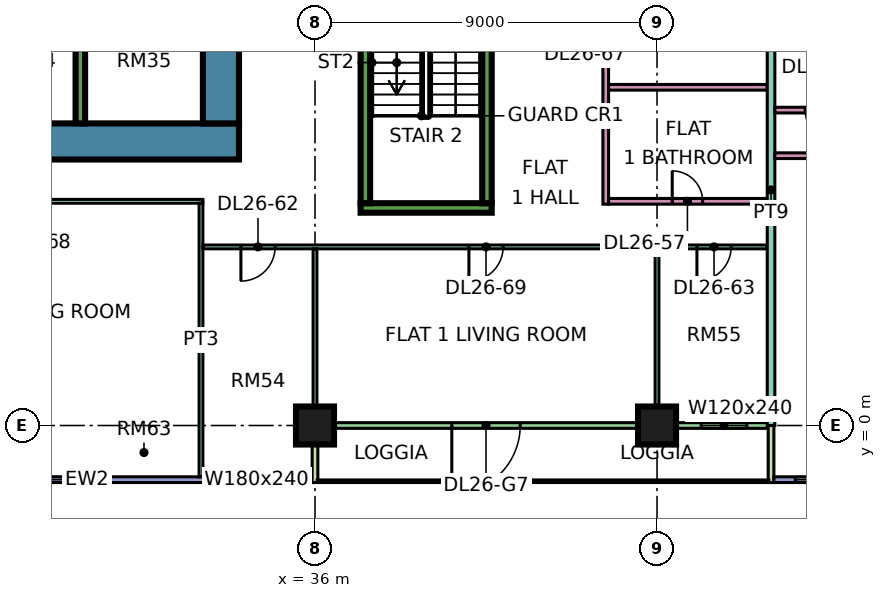
"""IFC4 building model, lengths in metres.
Left out: names, types, materials, properties, quantities, classifications, styles, units other than length and angle.
Written with IfcOpenShell. Run it as: python <this file> out.ifc"""

import sys

from ifc_helpers import new_model, si_unit, direction, frame, frame_2d, origin, origin_2d, place, context, subcontext, project, spatial, rectangle, extrude, element, fill, save


model = new_model("IFC4")
c1 = context("Model", 3, precision=1e-05, world=origin(), true_north=direction((0.0, 1.0)))
c2 = subcontext(c1, "Body", "Model", "MODEL_VIEW")
j1 = project(units=[si_unit("LENGTHUNIT", "METRE"), si_unit("PLANEANGLEUNIT", "RADIAN")], contexts=[c1])
p1 = place(None, origin())
s1 = spatial("IfcSite", under=j1, at=p1, CompositionType="ELEMENT")
p2 = place(p1, origin())
s2 = spatial("IfcBuilding", under=s1, at=p2, CompositionType="ELEMENT")
p3 = place(p2, frame((0.0, 0.0, 114.4)))
s3 = spatial("IfcBuildingStorey", under=s2, at=p3, CompositionType="ELEMENT", Elevation=114.4)
for number, where, z_axis, x_axis in (
    (1, (36.0, 0.0, 0.0), (0.0, 0.0, 1.0), (1.0, 0.0, 0.0)),
    (2, (45.0, 0.0, 0.0), (0.0, 0.0, 1.0), (1.0, 0.0, 0.0)),
):
    element("IfcColumn", number, at=place(p3, frame(where, z_axis=z_axis, x_axis=x_axis)), inside=s3, PredefinedType="COLUMN", context=c2, shape_type="SweptSolid", body=[
        extrude(rectangle(XDim=1.0, YDim=1.0, at=origin_2d()), origin(), (0.0, 0.0, 1.0), 3.75),
    ])
p4 = place(p3, frame((9.0, 7.475, 0.0), z_axis=(0.0, 0.0, 1.0), x_axis=(1.0, 0.0, 0.0)))
e3 = element("IfcWall", 3, at=p4, inside=s3, PredefinedType="SHEAR", context=c2, shape_type="SweptSolid", body=[
    extrude(rectangle(XDim=25.0, YDim=0.95, at=frame_2d((12.5, 0.0))), origin(), (0.0, 0.0, 1.0), 3.75),
])
p5 = place(p3, frame((33.525, 7.95, 0.0), z_axis=(0.0, 0.0, 1.0), x_axis=(0.0, 1.0, 0.0)))
e4 = element("IfcWall", 4, at=p5, inside=s3, PredefinedType="SHEAR", context=c2, shape_type="SweptSolid", body=[
    extrude(rectangle(XDim=11.1, YDim=0.95, at=frame_2d((5.55, 0.0))), origin(), (0.0, 0.0, 1.0), 3.75),
])
p6 = place(p5, frame((5.25, 0.0, 0.0)))
e5 = element("IfcOpeningElement", 5, at=p6, cuts=e4, PredefinedType="OPENING", context=c2, shape_type="SweptSolid", body=[
    extrude(rectangle(XDim=1.8, YDim=2.4, at=frame_2d((0.9, 1.2))), frame((0.0, 0.485, 0.0), z_axis=(0.0, -1.0, 0.0), x_axis=(1.0, 0.0, 0.0)), (0.0, 0.0, 1.0), 0.97),
])
p7 = place(p3, frame((29.825, 7.95, 0.0), z_axis=(0.0, 0.0, 1.0), x_axis=(0.0, 1.0, 0.0)))
e6 = element("IfcWall", 6, at=p7, inside=s3, PredefinedType="SHEAR", context=c2, shape_type="SweptSolid", body=[
    extrude(rectangle(XDim=3.25, YDim=0.25, at=frame_2d((1.625, 0.0))), origin(), (0.0, 0.0, 1.0), 3.75),
])
p8 = place(p3, frame((37.2, 5.725, 0.0), z_axis=(0.0, 0.0, 1.0), x_axis=(1.0, 0.0, 0.0)))
e7 = element("IfcWall", 7, at=p8, inside=s3, PredefinedType="SHEAR", context=c2, shape_type="SweptSolid", body=[
    extrude(rectangle(XDim=3.45, YDim=0.25, at=frame_2d((1.725, 0.0))), origin(), (0.0, 0.0, 1.0), 3.75),
])
for number, where, z_axis, x_axis in (
    (8, (37.325, 5.85, 0.0), (0.0, 0.0, 1.0), (0.0, 1.0, 0.0)),
    (9, (40.525, 5.85, 0.0), (0.0, 0.0, 1.0), (0.0, 1.0, 0.0)),
):
    element("IfcWall", number, at=place(p3, frame(where, z_axis=z_axis, x_axis=x_axis)), inside=s3, PredefinedType="SHEAR", context=c2, shape_type="SweptSolid", body=[
        extrude(rectangle(XDim=6.5, YDim=0.25, at=frame_2d((3.25, 0.0))), origin(), (0.0, 0.0, 1.0), 3.75),
    ])
p9 = place(p3, frame((24.075, -1.425, 0.0), z_axis=(0.0, 0.0, 1.0), x_axis=(1.0, 0.0, 0.0)))
e10 = element("IfcWall", 10, at=p9, inside=s3, PredefinedType="SOLIDWALL", context=c2, shape_type="SweptSolid", body=[
    extrude(rectangle(XDim=11.85, YDim=0.15, at=frame_2d((5.925, 0.0))), origin(), (0.0, 0.0, 1.0), 3.35),
])
p10 = place(p9, frame((2.962, 0.0, 0.45)))
e11 = element("IfcOpeningElement", 11, at=p10, cuts=e10, PredefinedType="OPENING", context=c2, shape_type="SweptSolid", body=[
    extrude(rectangle(XDim=3.0, YDim=2.4, at=frame_2d((1.5, 1.2))), frame((0.0, 0.085, 0.0), z_axis=(0.0, -1.0, 0.0), x_axis=(1.0, 0.0, 0.0)), (0.0, 0.0, 1.0), 0.17),
])
p11 = place(p9, frame((9.488, 0.0, 0.45)))
e12 = element("IfcOpeningElement", 12, at=p11, cuts=e10, PredefinedType="OPENING", context=c2, shape_type="SweptSolid", body=[
    extrude(rectangle(XDim=1.8, YDim=2.4, at=frame_2d((0.9, 1.2))), frame((0.0, 0.085, 0.0), z_axis=(0.0, -1.0, 0.0), x_axis=(1.0, 0.0, 0.0)), (0.0, 0.0, 1.0), 0.17),
])
p12 = place(p3, frame((36.075, 0.0, 0.0), z_axis=(0.0, 0.0, 1.0), x_axis=(1.0, 0.0, 0.0)))
e13 = element("IfcWall", 13, at=p12, inside=s3, PredefinedType="SOLIDWALL", context=c2, shape_type="SweptSolid", body=[
    extrude(rectangle(XDim=11.85, YDim=0.15, at=frame_2d((5.925, 0.0))), origin(), (0.0, 0.0, 1.0), 3.35),
])
p13 = place(p12, frame((3.525, 0.0, 0.0)))
e14 = element("IfcOpeningElement", 14, at=p13, cuts=e13, PredefinedType="OPENING", context=c2, shape_type="SweptSolid", body=[
    extrude(rectangle(XDim=1.8, YDim=2.4, at=frame_2d((0.9, 1.2))), frame((0.0, 0.085, 0.0), z_axis=(0.0, -1.0, 0.0), x_axis=(1.0, 0.0, 0.0)), (0.0, 0.0, 1.0), 0.17),
])
p14 = place(p12, frame((10.087, 0.0, 0.45)))
e15 = element("IfcOpeningElement", 15, at=p14, cuts=e13, PredefinedType="OPENING", context=c2, shape_type="SweptSolid", body=[
    extrude(rectangle(XDim=1.2, YDim=2.4, at=frame_2d((0.6, 1.2))), frame((0.0, 0.085, 0.0), z_axis=(0.0, -1.0, 0.0), x_axis=(1.0, 0.0, 0.0)), (0.0, 0.0, 1.0), 0.17),
])
for number, where, z_axis, x_axis in (
    (16, (36.0, -1.5, 0.0), (0.0, 0.0, 1.0), (0.0, 1.0, 0.0)),
    (17, (48.0, -1.5, 0.0), (0.0, 0.0, 1.0), (0.0, 1.0, 0.0)),
):
    element("IfcWall", number, at=place(p3, frame(where, z_axis=z_axis, x_axis=x_axis)), inside=s3, PredefinedType="SOLIDWALL", context=c2, shape_type="SweptSolid", body=[
        extrude(rectangle(XDim=1.5, YDim=0.15, at=frame_2d((0.75, 0.0))), origin(), (0.0, 0.0, 1.0), 3.35),
    ])
p15 = place(p3, frame((48.075, -1.425, 0.0), z_axis=(0.0, 0.0, 1.0), x_axis=(1.0, 0.0, 0.0)))
e18 = element("IfcWall", 18, at=p15, inside=s3, PredefinedType="SOLIDWALL", context=c2, shape_type="SweptSolid", body=[
    extrude(rectangle(XDim=11.85, YDim=0.15, at=frame_2d((5.925, 0.0))), origin(), (0.0, 0.0, 1.0), 3.35),
])
p16 = place(p15, frame((0.562, 0.0, 0.45)))
e19 = element("IfcOpeningElement", 19, at=p16, cuts=e18, PredefinedType="OPENING", context=c2, shape_type="SweptSolid", body=[
    extrude(rectangle(XDim=1.8, YDim=2.4, at=frame_2d((0.9, 1.2))), frame((0.0, 0.085, 0.0), z_axis=(0.0, -1.0, 0.0), x_axis=(1.0, 0.0, 0.0)), (0.0, 0.0, 1.0), 0.17),
])
p17 = place(p15, frame((3.525, 0.0, 0.45)))
e20 = element("IfcOpeningElement", 20, at=p17, cuts=e18, PredefinedType="OPENING", context=c2, shape_type="SweptSolid", body=[
    extrude(rectangle(XDim=1.8, YDim=2.4, at=frame_2d((0.9, 1.2))), frame((0.0, 0.085, 0.0), z_axis=(0.0, -1.0, 0.0), x_axis=(1.0, 0.0, 0.0)), (0.0, 0.0, 1.0), 0.17),
])
p18 = place(p15, frame((7.387, 0.0, 0.45)))
e21 = element("IfcOpeningElement", 21, at=p18, cuts=e18, PredefinedType="OPENING", context=c2, shape_type="SweptSolid", body=[
    extrude(rectangle(XDim=3.0, YDim=2.4, at=frame_2d((1.5, 1.2))), frame((0.0, 0.085, 0.0), z_axis=(0.0, -1.0, 0.0), x_axis=(1.0, 0.0, 0.0)), (0.0, 0.0, 1.0), 0.17),
])
p19 = place(p3, frame((11.95, 5.9, 0.0), z_axis=(0.0, 0.0, 1.0), x_axis=(1.0, 0.0, 0.0)))
e22 = element("IfcWall", 22, at=p19, inside=s3, PredefinedType="PARTITIONING", context=c2, shape_type="SweptSolid", body=[
    extrude(rectangle(XDim=21.1, YDim=0.1, at=frame_2d((10.55, 0.0))), origin(), (0.0, 0.0, 1.0), 3.35),
])
p20 = place(p19, frame((1.1, 0.0, 0.0)))
e23 = element("IfcOpeningElement", 23, at=p20, cuts=e22, PredefinedType="OPENING", context=c2, shape_type="SweptSolid", body=[
    extrude(rectangle(XDim=0.9, YDim=2.1, at=frame_2d((0.45, 1.05))), frame((0.0, 0.06, 0.0), z_axis=(0.0, -1.0, 0.0), x_axis=(1.0, 0.0, 0.0)), (0.0, 0.0, 1.0), 0.12),
])
p21 = place(p19, frame((4.1, 0.0, 0.0)))
e24 = element("IfcOpeningElement", 24, at=p21, cuts=e22, PredefinedType="OPENING", context=c2, shape_type="SweptSolid", body=[
    extrude(rectangle(XDim=0.9, YDim=2.1, at=frame_2d((0.45, 1.05))), frame((0.0, 0.06, 0.0), z_axis=(0.0, -1.0, 0.0), x_axis=(1.0, 0.0, 0.0)), (0.0, 0.0, 1.0), 0.12),
])
p22 = place(p19, frame((7.1, 0.0, 0.0)))
e25 = element("IfcOpeningElement", 25, at=p22, cuts=e22, PredefinedType="OPENING", context=c2, shape_type="SweptSolid", body=[
    extrude(rectangle(XDim=0.9, YDim=2.1, at=frame_2d((0.45, 1.05))), frame((0.0, 0.06, 0.0), z_axis=(0.0, -1.0, 0.0), x_axis=(1.0, 0.0, 0.0)), (0.0, 0.0, 1.0), 0.12),
])
p23 = place(p19, frame((10.1, 0.0, 0.0)))
e26 = element("IfcOpeningElement", 26, at=p23, cuts=e22, PredefinedType="OPENING", context=c2, shape_type="SweptSolid", body=[
    extrude(rectangle(XDim=0.9, YDim=2.1, at=frame_2d((0.45, 1.05))), frame((0.0, 0.06, 0.0), z_axis=(0.0, -1.0, 0.0), x_axis=(1.0, 0.0, 0.0)), (0.0, 0.0, 1.0), 0.12),
])
p24 = place(p19, frame((16.1, 0.0, 0.0)))
e27 = element("IfcOpeningElement", 27, at=p24, cuts=e22, PredefinedType="OPENING", context=c2, shape_type="SweptSolid", body=[
    extrude(rectangle(XDim=0.9, YDim=2.1, at=frame_2d((0.45, 1.05))), frame((0.0, 0.06, 0.0), z_axis=(0.0, -1.0, 0.0), x_axis=(1.0, 0.0, 0.0)), (0.0, 0.0, 1.0), 0.12),
])
p25 = place(p3, frame((33.0, -1.35, 0.0), z_axis=(0.0, 0.0, 1.0), x_axis=(0.0, 1.0, 0.0)))
e28 = element("IfcWall", 28, at=p25, inside=s3, PredefinedType="PARTITIONING", context=c2, shape_type="SweptSolid", body=[
    extrude(rectangle(XDim=7.2, YDim=0.1, at=frame_2d((3.6, 0.0))), origin(), (0.0, 0.0, 1.0), 3.35),
])
p26 = place(p3, frame((33.05, 4.7, 0.0), z_axis=(0.0, 0.0, 1.0), x_axis=(1.0, 0.0, 0.0)))
e29 = element("IfcWall", 29, at=p26, inside=s3, PredefinedType="PARTITIONING", context=c2, shape_type="SweptSolid", body=[
    extrude(rectangle(XDim=14.85, YDim=0.1, at=frame_2d((7.425, 0.0))), origin(), (0.0, 0.0, 1.0), 3.35),
])
p27 = place(p26, frame((1.0, 0.0, 0.0)))
e30 = element("IfcOpeningElement", 30, at=p27, cuts=e29, PredefinedType="OPENING", context=c2, shape_type="SweptSolid", body=[
    extrude(rectangle(XDim=0.9, YDim=2.1, at=frame_2d((0.45, 1.05))), frame((0.0, 0.06, 0.0), z_axis=(0.0, -1.0, 0.0), x_axis=(1.0, 0.0, 0.0)), (0.0, 0.0, 1.0), 0.12),
])
p28 = place(p26, frame((13.0, 0.0, 0.0)))
e31 = element("IfcOpeningElement", 31, at=p28, cuts=e29, PredefinedType="OPENING", context=c2, shape_type="SweptSolid", body=[
    extrude(rectangle(XDim=0.9, YDim=2.1, at=frame_2d((0.45, 1.05))), frame((0.0, 0.06, 0.0), z_axis=(0.0, -1.0, 0.0), x_axis=(1.0, 0.0, 0.0)), (0.0, 0.0, 1.0), 0.12),
])
p29 = place(p26, frame((7.0, 0.0, 0.0)))
e32 = element("IfcOpeningElement", 32, at=p29, cuts=e29, PredefinedType="OPENING", context=c2, shape_type="SweptSolid", body=[
    extrude(rectangle(XDim=0.9, YDim=2.1, at=frame_2d((0.45, 1.05))), frame((0.0, 0.06, 0.0), z_axis=(0.0, -1.0, 0.0), x_axis=(1.0, 0.0, 0.0)), (0.0, 0.0, 1.0), 0.12),
])
p30 = place(p3, frame((36.0, 0.0, 0.0), z_axis=(0.0, 0.0, 1.0), x_axis=(0.0, 1.0, 0.0)))
e33 = element("IfcWall", 33, at=p30, inside=s3, PredefinedType="PARTITIONING", context=c2, shape_type="SweptSolid", body=[
    extrude(rectangle(XDim=4.65, YDim=0.1, at=frame_2d((2.325, 0.0))), origin(), (0.0, 0.0, 1.0), 3.35),
])
p31 = place(p3, frame((43.65, 5.825, 0.0), z_axis=(0.0, 0.0, 1.0), x_axis=(0.0, 1.0, 0.0)))
e34 = element("IfcWall", 34, at=p31, inside=s3, PredefinedType="PARTITIONING", context=c2, shape_type="SweptSolid", body=[
    extrude(rectangle(XDim=6.575, YDim=0.15, at=frame_2d((3.288, 0.0))), origin(), (0.0, 0.0, 1.0), 3.35),
])
p32 = place(p31, frame((4.425, 0.0, 0.0)))
e35 = element("IfcOpeningElement", 35, at=p32, cuts=e34, PredefinedType="OPENING", context=c2, shape_type="SweptSolid", body=[
    extrude(rectangle(XDim=0.9, YDim=2.1, at=frame_2d((0.45, 1.05))), frame((0.0, 0.085, 0.0), z_axis=(0.0, -1.0, 0.0), x_axis=(1.0, 0.0, 0.0)), (0.0, 0.0, 1.0), 0.17),
])
p33 = place(p3, frame((43.725, 5.9, 0.0), z_axis=(0.0, 0.0, 1.0), x_axis=(1.0, 0.0, 0.0)))
e36 = element("IfcWall", 36, at=p33, inside=s3, PredefinedType="PARTITIONING", context=c2, shape_type="SweptSolid", body=[
    extrude(rectangle(XDim=4.175, YDim=0.15, at=frame_2d((2.087, 0.0))), origin(), (0.0, 0.0, 1.0), 3.35),
])
p34 = place(p33, frame((1.675, 0.0, 0.0)))
e37 = element("IfcOpeningElement", 37, at=p34, cuts=e36, PredefinedType="OPENING", context=c2, shape_type="SweptSolid", body=[
    extrude(rectangle(XDim=0.8, YDim=2.1, at=frame_2d((0.4, 1.05))), frame((0.0, 0.085, 0.0), z_axis=(0.0, -1.0, 0.0), x_axis=(1.0, 0.0, 0.0)), (0.0, 0.0, 1.0), 0.17),
])
p35 = place(p3, frame((43.725, 8.9, 0.0), z_axis=(0.0, 0.0, 1.0), x_axis=(1.0, 0.0, 0.0)))
e38 = element("IfcWall", 38, at=p35, inside=s3, PredefinedType="PARTITIONING", context=c2, shape_type="SweptSolid", body=[
    extrude(rectangle(XDim=4.175, YDim=0.15, at=frame_2d((2.087, 0.0))), origin(), (0.0, 0.0, 1.0), 3.35),
])
p36 = place(p3, frame((45.0, 0.074, 0.0), z_axis=(0.0, 0.0, 1.0), x_axis=(0.0, 1.0, 0.0)))
e39 = element("IfcWall", 39, at=p36, inside=s3, PredefinedType="PARTITIONING", context=c2, shape_type="SweptSolid", body=[
    extrude(rectangle(XDim=4.576, YDim=0.1, at=frame_2d((2.288, 0.0))), origin(), (0.0, 0.0, 1.0), 3.35),
])
p37 = place(p3, frame((48.0, 0.0, 0.0), z_axis=(0.0, 0.0, 1.0), x_axis=(0.0, 1.0, 0.0)))
e40 = element("IfcWall", 40, at=p37, inside=s3, PredefinedType="PARTITIONING", context=c2, shape_type="SweptSolid", body=[
    extrude(rectangle(XDim=12.4, YDim=0.2, at=frame_2d((6.2, 0.0))), origin(), (0.0, 0.0, 1.0), 3.35),
])
p38 = place(p3, frame((48.1, 7.1, 0.0), z_axis=(0.0, 0.0, 1.0), x_axis=(1.0, 0.0, 0.0)))
e41 = element("IfcWall", 41, at=p38, inside=s3, PredefinedType="PARTITIONING", context=c2, shape_type="SweptSolid", body=[
    extrude(rectangle(XDim=25.25, YDim=0.15, at=frame_2d((12.625, 0.0))), origin(), (0.0, 0.0, 1.0), 3.35),
])
p39 = place(p38, frame((0.95, 0.0, 0.0)))
e42 = element("IfcOpeningElement", 42, at=p39, cuts=e41, PredefinedType="OPENING", context=c2, shape_type="SweptSolid", body=[
    extrude(rectangle(XDim=0.9, YDim=2.1, at=frame_2d((0.45, 1.05))), frame((0.0, 0.085, 0.0), z_axis=(0.0, -1.0, 0.0), x_axis=(1.0, 0.0, 0.0)), (0.0, 0.0, 1.0), 0.17),
])
p40 = place(p38, frame((21.95, 0.0, 0.0)))
e43 = element("IfcOpeningElement", 43, at=p40, cuts=e41, PredefinedType="OPENING", context=c2, shape_type="SweptSolid", body=[
    extrude(rectangle(XDim=0.9, YDim=2.1, at=frame_2d((0.45, 1.05))), frame((0.0, 0.085, 0.0), z_axis=(0.0, -1.0, 0.0), x_axis=(1.0, 0.0, 0.0)), (0.0, 0.0, 1.0), 0.17),
])
p41 = place(p38, frame((9.95, 0.0, 0.0)))
e44 = element("IfcOpeningElement", 44, at=p41, cuts=e41, PredefinedType="OPENING", context=c2, shape_type="SweptSolid", body=[
    extrude(rectangle(XDim=0.9, YDim=2.1, at=frame_2d((0.45, 1.05))), frame((0.0, 0.085, 0.0), z_axis=(0.0, -1.0, 0.0), x_axis=(1.0, 0.0, 0.0)), (0.0, 0.0, 1.0), 0.17),
])
p42 = place(p38, frame((14.45, 0.0, 0.0)))
e45 = element("IfcOpeningElement", 45, at=p42, cuts=e41, PredefinedType="OPENING", context=c2, shape_type="SweptSolid", body=[
    extrude(rectangle(XDim=0.9, YDim=2.1, at=frame_2d((0.45, 1.05))), frame((0.0, 0.085, 0.0), z_axis=(0.0, -1.0, 0.0), x_axis=(1.0, 0.0, 0.0)), (0.0, 0.0, 1.0), 0.17),
])
p43 = place(p38, frame((19.8, 0.0, 0.0)))
e46 = element("IfcOpeningElement", 46, at=p43, cuts=e41, PredefinedType="OPENING", context=c2, shape_type="SweptSolid", body=[
    extrude(rectangle(XDim=0.8, YDim=2.1, at=frame_2d((0.4, 1.05))), frame((0.0, 0.085, 0.0), z_axis=(0.0, -1.0, 0.0), x_axis=(1.0, 0.0, 0.0)), (0.0, 0.0, 1.0), 0.17),
])
p44 = place(p38, frame((3.95, 0.0, 0.0)))
e47 = element("IfcOpeningElement", 47, at=p44, cuts=e41, PredefinedType="OPENING", context=c2, shape_type="SweptSolid", body=[
    extrude(rectangle(XDim=0.9, YDim=2.1, at=frame_2d((0.45, 1.05))), frame((0.0, 0.085, 0.0), z_axis=(0.0, -1.0, 0.0), x_axis=(1.0, 0.0, 0.0)), (0.0, 0.0, 1.0), 0.17),
])
p45 = place(p3, frame((48.1, 8.3, 0.0), z_axis=(0.0, 0.0, 1.0), x_axis=(1.0, 0.0, 0.0)))
e48 = element("IfcWall", 48, at=p45, inside=s3, PredefinedType="PARTITIONING", context=c2, shape_type="SweptSolid", body=[
    extrude(rectangle(XDim=12.575, YDim=0.15, at=frame_2d((6.288, 0.0))), origin(), (0.0, 0.0, 1.0), 3.35),
])
p46 = place(p45, frame((3.75, 0.0, 0.0)))
e49 = element("IfcOpeningElement", 49, at=p46, cuts=e48, PredefinedType="OPENING", context=c2, shape_type="SweptSolid", body=[
    extrude(rectangle(XDim=0.8, YDim=2.1, at=frame_2d((0.4, 1.05))), frame((0.0, 0.085, 0.0), z_axis=(0.0, -1.0, 0.0), x_axis=(1.0, 0.0, 0.0)), (0.0, 0.0, 1.0), 0.17),
])
p47 = place(p45, frame((0.8, 0.0, 0.0)))
e50 = element("IfcOpeningElement", 50, at=p47, cuts=e48, PredefinedType="OPENING", context=c2, shape_type="SweptSolid", body=[
    extrude(rectangle(XDim=0.9, YDim=2.1, at=frame_2d((0.45, 1.05))), frame((0.0, 0.085, 0.0), z_axis=(0.0, -1.0, 0.0), x_axis=(1.0, 0.0, 0.0)), (0.0, 0.0, 1.0), 0.17),
])
p48 = place(p45, frame((6.75, 0.0, 0.0)))
e51 = element("IfcOpeningElement", 51, at=p48, cuts=e48, PredefinedType="OPENING", context=c2, shape_type="SweptSolid", body=[
    extrude(rectangle(XDim=0.8, YDim=2.1, at=frame_2d((0.4, 1.05))), frame((0.0, 0.085, 0.0), z_axis=(0.0, -1.0, 0.0), x_axis=(1.0, 0.0, 0.0)), (0.0, 0.0, 1.0), 0.17),
])
p49 = place(p45, frame((10.2, 0.0, 0.0)))
e52 = element("IfcOpeningElement", 52, at=p49, cuts=e48, PredefinedType="OPENING", context=c2, shape_type="SweptSolid", body=[
    extrude(rectangle(XDim=0.8, YDim=2.1, at=frame_2d((0.4, 1.05))), frame((0.0, 0.085, 0.0), z_axis=(0.0, -1.0, 0.0), x_axis=(1.0, 0.0, 0.0)), (0.0, 0.0, 1.0), 0.17),
])
p50 = place(p10, origin())
e53 = element("IfcWindow", 53, at=p50, inside=s3, PartitioningType="SINGLE_PANEL", PredefinedType="WINDOW", context=c2, shape_type="SweptSolid", body=[
    extrude(rectangle(XDim=3.0, YDim=2.4, at=frame_2d((1.5, 1.2))), frame((0.0, 0.03, 0.0), z_axis=(0.0, -1.0, 0.0), x_axis=(1.0, 0.0, 0.0)), (0.0, 0.0, 1.0), 0.06),
])
fill(e11, e53)
p51 = place(p11, origin())
e54 = element("IfcWindow", 54, at=p51, inside=s3, PartitioningType="SINGLE_PANEL", PredefinedType="WINDOW", context=c2, shape_type="SweptSolid", body=[
    extrude(rectangle(XDim=1.8, YDim=2.4, at=frame_2d((0.9, 1.2))), frame((0.0, 0.03, 0.0), z_axis=(0.0, -1.0, 0.0), x_axis=(1.0, 0.0, 0.0)), (0.0, 0.0, 1.0), 0.06),
])
fill(e12, e54)
p52 = place(p13, frame((1.8, 0.0, 0.0), z_axis=(0.0, 0.0, 1.0), x_axis=(-1.0, 0.0, 0.0)))
e55 = element("IfcDoor", 55, at=p52, inside=s3, OperationType="DOUBLE_DOOR_SINGLE_SWING", PredefinedType="DOOR", context=c2, shape_type="SweptSolid", body=[
    extrude(rectangle(XDim=1.8, YDim=2.4, at=frame_2d((0.9, 1.2))), frame((0.0, 0.025, 0.0), z_axis=(0.0, -1.0, 0.0), x_axis=(1.0, 0.0, 0.0)), (0.0, 0.0, 1.0), 0.05),
])
fill(e14, e55)
p53 = place(p14, origin())
e56 = element("IfcWindow", 56, at=p53, inside=s3, PartitioningType="SINGLE_PANEL", PredefinedType="WINDOW", context=c2, shape_type="SweptSolid", body=[
    extrude(rectangle(XDim=1.2, YDim=2.4, at=frame_2d((0.6, 1.2))), frame((0.0, 0.03, 0.0), z_axis=(0.0, -1.0, 0.0), x_axis=(1.0, 0.0, 0.0)), (0.0, 0.0, 1.0), 0.06),
])
fill(e15, e56)
p54 = place(p16, origin())
e57 = element("IfcWindow", 57, at=p54, inside=s3, PartitioningType="SINGLE_PANEL", PredefinedType="WINDOW", context=c2, shape_type="SweptSolid", body=[
    extrude(rectangle(XDim=1.8, YDim=2.4, at=frame_2d((0.9, 1.2))), frame((0.0, 0.03, 0.0), z_axis=(0.0, -1.0, 0.0), x_axis=(1.0, 0.0, 0.0)), (0.0, 0.0, 1.0), 0.06),
])
fill(e19, e57)
p55 = place(p47, origin())
e58 = element("IfcDoor", 58, at=p55, inside=s3, OperationType="SINGLE_SWING_RIGHT", PredefinedType="DOOR", context=c2, shape_type="SweptSolid", body=[
    extrude(rectangle(XDim=0.9, YDim=2.1, at=frame_2d((0.45, 1.05))), frame((0.0, 0.025, 0.0), z_axis=(0.0, -1.0, 0.0), x_axis=(1.0, 0.0, 0.0)), (0.0, 0.0, 1.0), 0.05),
])
fill(e50, e58)
p56 = place(p34, origin())
e59 = element("IfcDoor", 59, at=p56, inside=s3, OperationType="SINGLE_SWING_LEFT", PredefinedType="DOOR", context=c2, shape_type="SweptSolid", body=[
    extrude(rectangle(XDim=0.8, YDim=2.1, at=frame_2d((0.4, 1.05))), frame((0.0, 0.025, 0.0), z_axis=(0.0, -1.0, 0.0), x_axis=(1.0, 0.0, 0.0)), (0.0, 0.0, 1.0), 0.05),
])
fill(e37, e59)
p57 = place(p27, frame((0.9, 0.0, 0.0), z_axis=(0.0, 0.0, 1.0), x_axis=(-1.0, 0.0, 0.0)))
e60 = element("IfcDoor", 60, at=p57, inside=s3, OperationType="SINGLE_SWING_LEFT", PredefinedType="DOOR", context=c2, shape_type="SweptSolid", body=[
    extrude(rectangle(XDim=0.9, YDim=2.1, at=frame_2d((0.45, 1.05))), frame((0.0, 0.025, 0.0), z_axis=(0.0, -1.0, 0.0), x_axis=(1.0, 0.0, 0.0)), (0.0, 0.0, 1.0), 0.05),
])
fill(e30, e60)
p58 = place(p28, frame((0.9, 0.0, 0.0), z_axis=(0.0, 0.0, 1.0), x_axis=(-1.0, 0.0, 0.0)))
e61 = element("IfcDoor", 61, at=p58, inside=s3, OperationType="SINGLE_SWING_LEFT", PredefinedType="DOOR", context=c2, shape_type="SweptSolid", body=[
    extrude(rectangle(XDim=0.9, YDim=2.1, at=frame_2d((0.45, 1.05))), frame((0.0, 0.025, 0.0), z_axis=(0.0, -1.0, 0.0), x_axis=(1.0, 0.0, 0.0)), (0.0, 0.0, 1.0), 0.05),
])
fill(e31, e61)
p59 = place(p29, frame((0.9, 0.0, 0.0), z_axis=(0.0, 0.0, 1.0), x_axis=(-1.0, 0.0, 0.0)))
e62 = element("IfcDoor", 62, at=p59, inside=s3, OperationType="SINGLE_SWING_LEFT", PredefinedType="DOOR", context=c2, shape_type="SweptSolid", body=[
    extrude(rectangle(XDim=0.9, YDim=2.1, at=frame_2d((0.45, 1.05))), frame((0.0, 0.025, 0.0), z_axis=(0.0, -1.0, 0.0), x_axis=(1.0, 0.0, 0.0)), (0.0, 0.0, 1.0), 0.05),
])
fill(e32, e62)
save(model, sys.argv[1])
